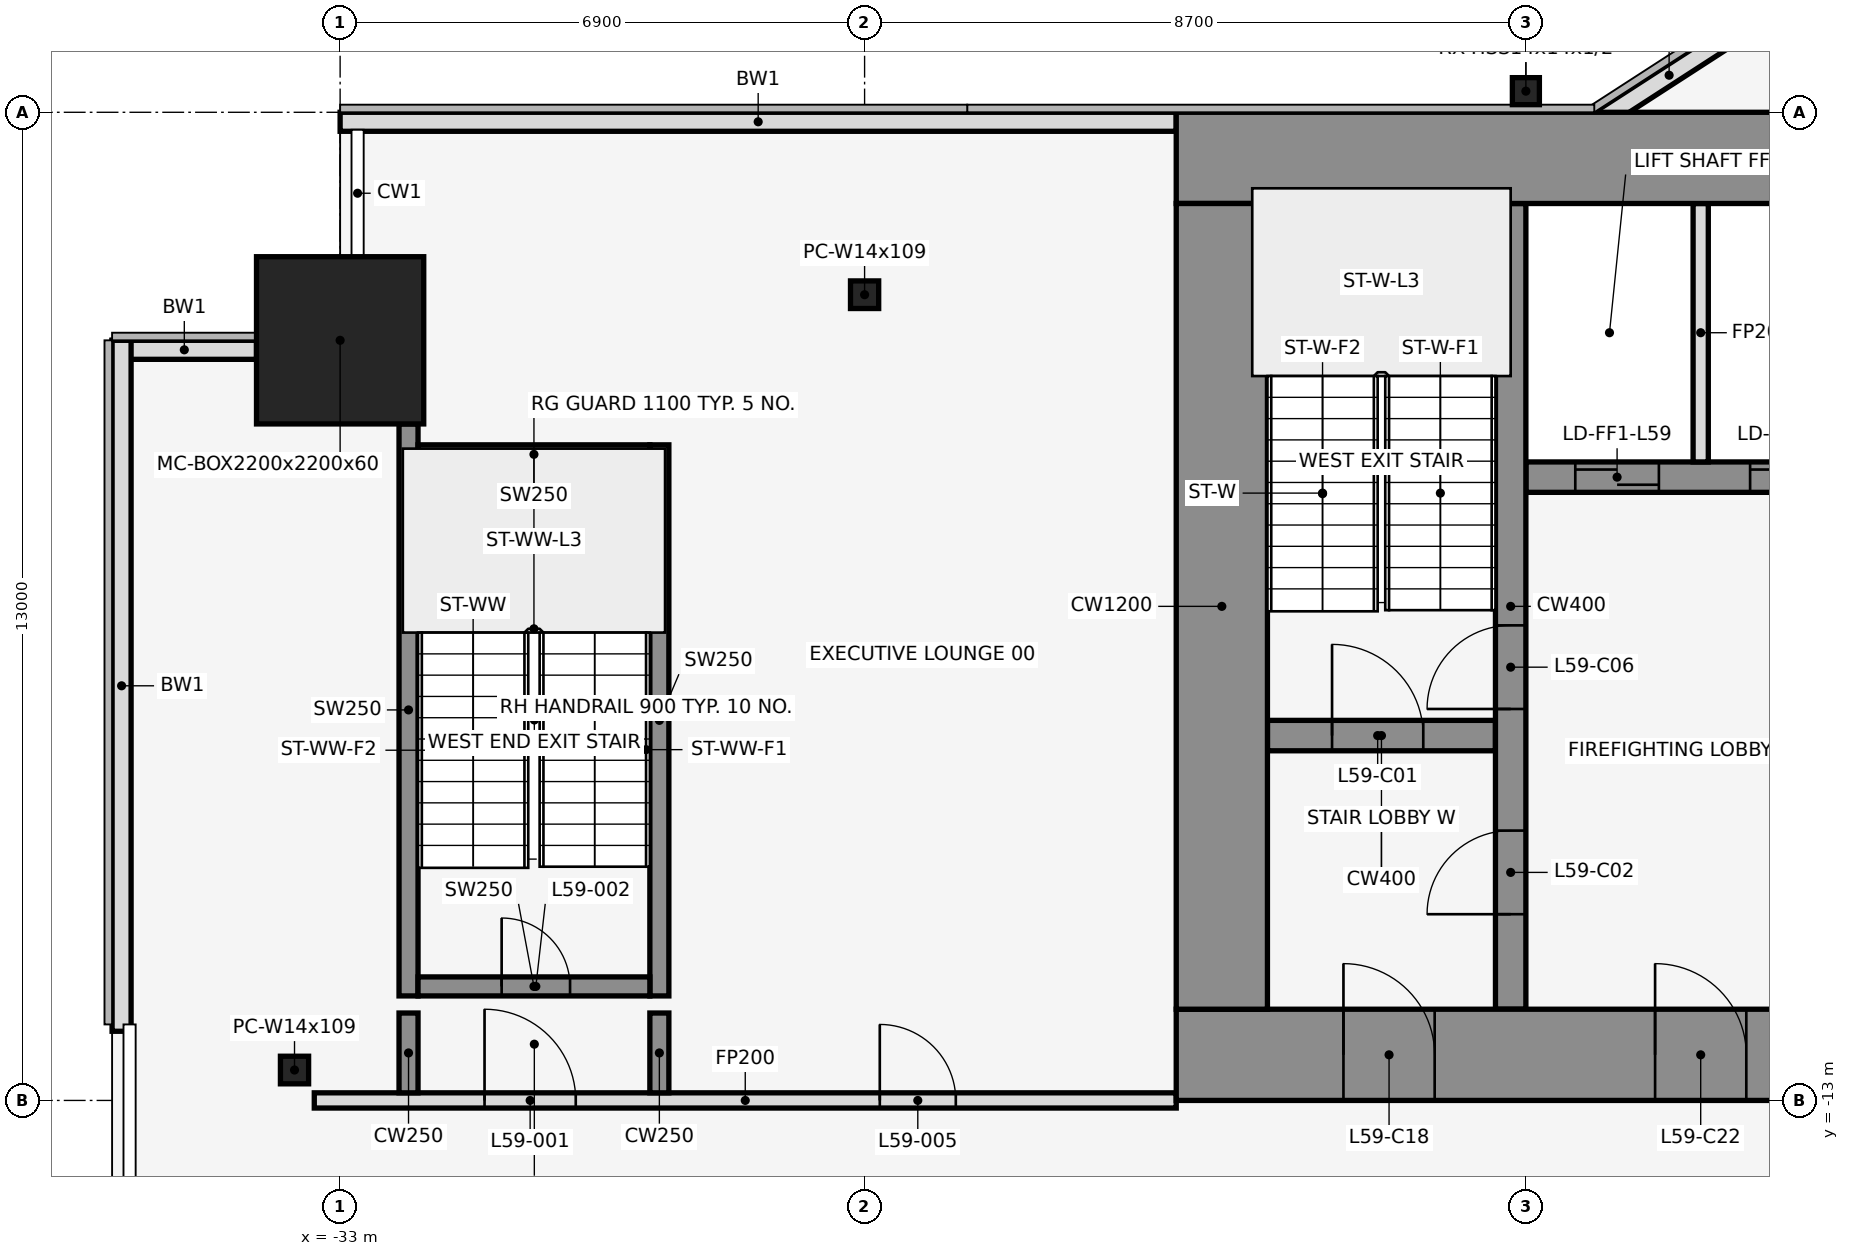
"""IFC4 building model, lengths in metres.
Left out: names, types, materials, properties, quantities, classifications, styles, units other than length and angle.
Written with IfcOpenShell. Run it as: python <this file> out.ifc"""

import sys

from ifc_helpers import new_model, si_unit, direction, frame, frame_2d, origin, origin_2d, place, context, subcontext, project, spatial, rectangle, hollow_rectangle, i_section, extrude, element, fill, save


model = new_model("IFC4")
c1 = context("Model", 3, precision=1e-05, world=origin(), true_north=direction((0.0, 1.0)))
c2 = subcontext(c1, "Body", "Model", "MODEL_VIEW")
j1 = project(units=[si_unit("LENGTHUNIT", "METRE"), si_unit("PLANEANGLEUNIT", "RADIAN")], contexts=[c1])
p1 = place(None, origin())
s1 = spatial("IfcSite", under=j1, at=p1, CompositionType="ELEMENT")
p2 = place(p1, origin())
s2 = spatial("IfcBuilding", under=s1, at=p2, CompositionType="ELEMENT")
p3 = place(p2, frame((0.0, 0.0, 262.4)))
s3 = spatial("IfcBuildingStorey", under=s2, at=p3, CompositionType="ELEMENT", Elevation=262.4)
p4 = place(p3, frame((-33.0, -3.0, 0.0), z_axis=(0.0, 0.0, 1.0), x_axis=(1.0, 0.0, 0.0)))
e1 = element("IfcColumn", 1, at=p4, inside=s3, PredefinedType="COLUMN", context=c2, shape_type="SweptSolid", body=[
    extrude(hollow_rectangle(XDim=2.2, YDim=2.2, WallThickness=0.06, at=origin_2d()), origin(), (0.0, 0.0, 1.0), 4.2),
])
p5 = place(p3, frame((-26.1, -2.4, 0.0), z_axis=(0.0, 0.0, 1.0), x_axis=(1.0, 0.0, 0.0)))
e2 = element("IfcColumn", 2, at=p5, inside=s3, PredefinedType="COLUMN", context=c2, shape_type="SweptSolid", body=[
    extrude(i_section(OverallWidth=0.371, OverallDepth=0.363, WebThickness=0.013, FlangeThickness=0.022, at=origin_2d()), origin(), (0.0, 0.0, 1.0), 4.2),
])
p6 = place(p3, frame((-17.4, 0.278, 0.0), z_axis=(0.0, 0.0, 1.0), x_axis=(1.0, 0.0, 0.0)))
e3 = element("IfcColumn", 3, at=p6, inside=s3, PredefinedType="COLUMN", context=c2, shape_type="SweptSolid", body=[
    extrude(hollow_rectangle(XDim=0.356, YDim=0.356, WallThickness=0.012, at=origin_2d()), origin(), (0.0, 0.0, 1.0), 4.2),
])
p7 = place(p3, frame((-33.6, -12.6, 0.0), z_axis=(0.0, 0.0, 1.0), x_axis=(1.0, 0.0, 0.0)))
e4 = element("IfcColumn", 4, at=p7, inside=s3, PredefinedType="COLUMN", context=c2, shape_type="SweptSolid", body=[
    extrude(i_section(OverallWidth=0.371, OverallDepth=0.363, WebThickness=0.013, FlangeThickness=0.022, at=origin_2d()), origin(), (0.0, 0.0, 1.0), 4.2),
])
p8 = place(p3, frame((-14.599, 1.08, 0.0), z_axis=(0.0, 0.0, 1.0), x_axis=(-0.83981312244, -0.542875602121, 0.0)))
e5 = element("IfcWall", 5, at=p8, inside=s3, PredefinedType="STANDARD", context=c2, shape_type="SweptSolid", body=[
    extrude(rectangle(XDim=2.183, YDim=0.25, at=frame_2d((1.091, 0.0))), origin(), (0.0, 0.0, 1.0), 4.05),
])
p9 = place(p3, frame((-22.0, -0.125, 0.0), z_axis=(0.0, 0.0, 1.0), x_axis=(-1.0, 0.0, 0.0)))
e6 = element("IfcWall", 6, at=p9, inside=s3, PredefinedType="STANDARD", context=c2, shape_type="SweptSolid", body=[
    extrude(rectangle(XDim=11.0, YDim=0.25, at=frame_2d((5.5, 0.0))), origin(), (0.0, 0.0, 1.0), 4.05),
])
p10 = place(p3, frame((-34.1, -3.125, 0.0), z_axis=(0.0, 0.0, 1.0), x_axis=(-1.0, 0.0, 0.0)))
e7 = element("IfcWall", 7, at=p10, inside=s3, PredefinedType="STANDARD", context=c2, shape_type="SweptSolid", body=[
    extrude(rectangle(XDim=1.9, YDim=0.25, at=frame_2d((0.95, 0.0))), origin(), (0.0, 0.0, 1.0), 4.05),
])
p11 = place(p3, frame((-35.875, -3.0, 0.0), z_axis=(0.0, 0.0, 1.0), x_axis=(0.0, -1.0, 0.0)))
e8 = element("IfcWall", 8, at=p11, inside=s3, PredefinedType="STANDARD", context=c2, shape_type="SweptSolid", body=[
    extrude(rectangle(XDim=9.09, YDim=0.25, at=frame_2d((4.545, 0.0))), origin(), (0.0, 0.0, 1.0), 4.05),
])
p12 = place(p3, frame((-32.1, -11.625, 0.0), z_axis=(0.0, 0.0, 1.0), x_axis=(0.0, 1.0, 0.0)))
e9 = element("IfcWall", 9, at=p12, inside=s3, PredefinedType="SHEAR", context=c2, shape_type="SweptSolid", body=[
    extrude(rectangle(XDim=7.525, YDim=0.25, at=frame_2d((3.762, 0.0))), origin(), (0.0, 0.0, 1.0), 4.2),
])
p13 = place(p3, frame((-28.8, -11.625, 0.0), z_axis=(0.0, 0.0, 1.0), x_axis=(0.0, 1.0, 0.0)))
e10 = element("IfcWall", 10, at=p13, inside=s3, PredefinedType="SHEAR", context=c2, shape_type="SweptSolid", body=[
    extrude(rectangle(XDim=7.25, YDim=0.25, at=frame_2d((3.625, 0.0))), origin(), (0.0, 0.0, 1.0), 4.2),
])
p14 = place(p3, frame((-31.975, -11.5, 0.0), z_axis=(0.0, 0.0, 1.0), x_axis=(1.0, 0.0, 0.0)))
e11 = element("IfcWall", 11, at=p14, inside=s3, PredefinedType="SHEAR", context=c2, shape_type="SweptSolid", body=[
    extrude(rectangle(XDim=3.05, YDim=0.25, at=frame_2d((1.525, 0.0))), origin(), (0.0, 0.0, 1.0), 4.2),
])
p15 = place(p14, frame((1.1, 0.0, 0.0)))
e12 = element("IfcOpeningElement", 12, at=p15, cuts=e11, PredefinedType="OPENING", context=c2, shape_type="SweptSolid", body=[
    extrude(rectangle(XDim=0.9, YDim=2.1, at=frame_2d((0.45, 1.05))), frame((0.0, 0.137, 0.0), z_axis=(0.0, -1.0, 0.0), x_axis=(1.0, 0.0, 0.0)), (0.0, 0.0, 1.0), 0.274),
])
p16 = place(p3, frame((-31.975, -4.5, 0.0), z_axis=(0.0, 0.0, 1.0), x_axis=(1.0, 0.0, 0.0)))
e13 = element("IfcWall", 13, at=p16, inside=s3, PredefinedType="SHEAR", context=c2, shape_type="SweptSolid", body=[
    extrude(rectangle(XDim=3.05, YDim=0.25, at=frame_2d((1.525, 0.0))), origin(), (0.0, 0.0, 1.0), 4.2),
])
p17 = place(p3, frame((-33.34, -13.0, 0.0), z_axis=(0.0, 0.0, 1.0), x_axis=(1.0, 0.0, 0.0)))
e14 = element("IfcWall", 14, at=p17, inside=s3, PredefinedType="PARTITIONING", context=c2, shape_type="SweptSolid", body=[
    extrude(rectangle(XDim=11.34, YDim=0.2, at=frame_2d((5.67, 0.0))), origin(), (0.0, 0.0, 1.0), 3.118),
])
p18 = place(p17, frame((2.24, 0.0, 0.0)))
e15 = element("IfcOpeningElement", 15, at=p18, cuts=e14, PredefinedType="OPENING", context=c2, shape_type="SweptSolid", body=[
    extrude(rectangle(XDim=1.2, YDim=2.1, at=frame_2d((0.6, 1.05))), frame((0.0, 0.112, 0.0), z_axis=(0.0, -1.0, 0.0), x_axis=(1.0, 0.0, 0.0)), (0.0, 0.0, 1.0), 0.224),
])
p19 = place(p17, frame((7.44, 0.0, 0.0)))
e16 = element("IfcOpeningElement", 16, at=p19, cuts=e14, PredefinedType="OPENING", context=c2, shape_type="SweptSolid", body=[
    extrude(rectangle(XDim=1.0, YDim=2.1, at=frame_2d((0.5, 1.05))), frame((0.0, 0.112, 0.0), z_axis=(0.0, -1.0, 0.0), x_axis=(1.0, 0.0, 0.0)), (0.0, 0.0, 1.0), 0.224),
])
for number, where, z_axis, x_axis in (
    (17, (-32.1, -12.9, 0.0), (0.0, 0.0, 1.0), (0.0, 1.0, 0.0)),
    (18, (-28.8, -12.9, 0.0), (0.0, 0.0, 1.0), (0.0, 1.0, 0.0)),
):
    element("IfcWall", number, at=place(p3, frame(where, z_axis=z_axis, x_axis=x_axis)), inside=s3, PredefinedType="SHEAR", context=c2, shape_type="SweptSolid", body=[
        extrude(rectangle(XDim=1.05, YDim=0.25, at=frame_2d((0.525, 0.0))), origin(), (0.0, 0.0, 1.0), 4.2),
    ])
p20 = place(p3, frame((-20.8, -8.2, 0.0), z_axis=(0.0, 0.0, 1.0), x_axis=(1.0, 0.0, 0.0)))
e19 = element("IfcWall", 19, at=p20, inside=s3, PredefinedType="SHEAR", context=c2, shape_type="SweptSolid", body=[
    extrude(rectangle(XDim=3.0, YDim=0.4, at=frame_2d((1.5, 0.0))), origin(), (0.0, 0.0, 1.0), 4.2),
])
p21 = place(p20, frame((0.85, 0.0, 0.0)))
e20 = element("IfcOpeningElement", 20, at=p21, cuts=e19, PredefinedType="OPENING", context=c2, shape_type="SweptSolid", body=[
    extrude(rectangle(XDim=1.2, YDim=2.1, at=frame_2d((0.6, 1.05))), frame((0.0, 0.212, 0.0), z_axis=(0.0, -1.0, 0.0), x_axis=(1.0, 0.0, 0.0)), (0.0, 0.0, 1.0), 0.424),
])
p22 = place(p3, frame((-17.4, -4.8, 0.0), z_axis=(0.0, 0.0, 1.0), x_axis=(1.0, 0.0, 0.0)))
e21 = element("IfcWall", 21, at=p22, inside=s3, PredefinedType="SHEAR", context=c2, shape_type="SweptSolid", body=[
    extrude(rectangle(XDim=13.6, YDim=0.4, at=frame_2d((6.8, 0.0))), origin(), (0.0, 0.0, 1.0), 4.2),
])
p23 = place(p22, frame((0.65, 0.0, 0.0)))
e22 = element("IfcOpeningElement", 22, at=p23, cuts=e21, PredefinedType="OPENING", context=c2, shape_type="SweptSolid", body=[
    extrude(rectangle(XDim=1.1, YDim=2.1, at=frame_2d((0.55, 1.05))), frame((0.0, 0.212, 0.0), z_axis=(0.0, -1.0, 0.0), x_axis=(1.0, 0.0, 0.0)), (0.0, 0.0, 1.0), 0.424),
])
p24 = place(p22, frame((2.95, 0.0, 0.0)))
e23 = element("IfcOpeningElement", 23, at=p24, cuts=e21, PredefinedType="OPENING", context=c2, shape_type="SweptSolid", body=[
    extrude(rectangle(XDim=1.1, YDim=2.1, at=frame_2d((0.55, 1.05))), frame((0.0, 0.212, 0.0), z_axis=(0.0, -1.0, 0.0), x_axis=(1.0, 0.0, 0.0)), (0.0, 0.0, 1.0), 0.424),
])
p25 = place(p22, frame((5.85, 0.0, 0.0)))
e24 = element("IfcOpeningElement", 24, at=p25, cuts=e21, PredefinedType="OPENING", context=c2, shape_type="SweptSolid", body=[
    extrude(rectangle(XDim=0.9, YDim=2.1, at=frame_2d((0.45, 1.05))), frame((0.0, 0.212, 0.0), z_axis=(0.0, -1.0, 0.0), x_axis=(1.0, 0.0, 0.0)), (0.0, 0.0, 1.0), 0.424),
])
p26 = place(p22, frame((10.25, 0.0, 0.0)))
e25 = element("IfcOpeningElement", 25, at=p26, cuts=e21, PredefinedType="OPENING", context=c2, shape_type="SweptSolid", body=[
    extrude(rectangle(XDim=0.9, YDim=2.1, at=frame_2d((0.45, 1.05))), frame((0.0, 0.212, 0.0), z_axis=(0.0, -1.0, 0.0), x_axis=(1.0, 0.0, 0.0)), (0.0, 0.0, 1.0), 0.424),
])
p27 = place(p3, frame((-17.6, -11.8, 0.0), z_axis=(0.0, 0.0, 1.0), x_axis=(0.0, 1.0, 0.0)))
e26 = element("IfcWall", 26, at=p27, inside=s3, PredefinedType="SHEAR", context=c2, shape_type="SweptSolid", body=[
    extrude(rectangle(XDim=10.6, YDim=0.4, at=frame_2d((5.3, 0.0))), origin(), (0.0, 0.0, 1.0), 4.2),
])
p28 = place(p27, frame((1.25, 0.0, 0.0)))
e27 = element("IfcOpeningElement", 27, at=p28, cuts=e26, PredefinedType="OPENING", context=c2, shape_type="SweptSolid", body=[
    extrude(rectangle(XDim=1.1, YDim=2.1, at=frame_2d((0.55, 1.05))), frame((0.0, 0.212, 0.0), z_axis=(0.0, -1.0, 0.0), x_axis=(1.0, 0.0, 0.0)), (0.0, 0.0, 1.0), 0.424),
])
p29 = place(p27, frame((3.95, 0.0, 0.0)))
e28 = element("IfcOpeningElement", 28, at=p29, cuts=e26, PredefinedType="OPENING", context=c2, shape_type="SweptSolid", body=[
    extrude(rectangle(XDim=1.1, YDim=2.1, at=frame_2d((0.55, 1.05))), frame((0.0, 0.212, 0.0), z_axis=(0.0, -1.0, 0.0), x_axis=(1.0, 0.0, 0.0)), (0.0, 0.0, 1.0), 0.424),
])
p30 = place(p3, frame((-15.1, -4.6, 0.0), z_axis=(0.0, 0.0, 1.0), x_axis=(0.0, 1.0, 0.0)))
e29 = element("IfcWall", 29, at=p30, inside=s3, PredefinedType="PARTITIONING", context=c2, shape_type="SweptSolid", body=[
    extrude(rectangle(XDim=3.4, YDim=0.2, at=frame_2d((1.7, 0.0))), origin(), (0.0, 0.0, 1.0), 3.118),
])
p31 = place(p3, frame((-22.0, -0.6, 0.0), z_axis=(0.0, 0.0, 1.0), x_axis=(1.0, 0.0, 0.0)))
e30 = element("IfcWall", 30, at=p31, inside=s3, PredefinedType="SHEAR", context=c2, shape_type="SweptSolid", body=[
    extrude(rectangle(XDim=44.0, YDim=1.2, at=frame_2d((22.0, 0.0))), origin(), (0.0, 0.0, 1.0), 4.2),
])
p32 = place(p31, frame((18.55, 0.0, 0.0)))
e31 = element("IfcOpeningElement", 31, at=p32, cuts=e30, PredefinedType="OPENING", context=c2, shape_type="SweptSolid", body=[
    extrude(rectangle(XDim=0.9, YDim=2.1, at=frame_2d((0.45, 1.05))), frame((0.0, 0.612, 0.0), z_axis=(0.0, -1.0, 0.0), x_axis=(1.0, 0.0, 0.0)), (0.0, 0.0, 1.0), 1.224),
])
p33 = place(p31, frame((24.55, 0.0, 0.0)))
e32 = element("IfcOpeningElement", 32, at=p33, cuts=e30, PredefinedType="OPENING", context=c2, shape_type="SweptSolid", body=[
    extrude(rectangle(XDim=0.9, YDim=2.1, at=frame_2d((0.45, 1.05))), frame((0.0, 0.612, 0.0), z_axis=(0.0, -1.0, 0.0), x_axis=(1.0, 0.0, 0.0)), (0.0, 0.0, 1.0), 1.224),
])
p34 = place(p3, frame((-22.0, -12.4, 0.0), z_axis=(0.0, 0.0, 1.0), x_axis=(1.0, 0.0, 0.0)))
e33 = element("IfcWall", 33, at=p34, inside=s3, PredefinedType="SHEAR", context=c2, shape_type="SweptSolid", body=[
    extrude(rectangle(XDim=44.0, YDim=1.2, at=frame_2d((22.0, 0.0))), origin(), (0.0, 0.0, 1.0), 4.2),
])
p35 = place(p34, frame((2.2, 0.0, 0.0)))
e34 = element("IfcOpeningElement", 34, at=p35, cuts=e33, PredefinedType="OPENING", context=c2, shape_type="SweptSolid", body=[
    extrude(rectangle(XDim=1.2, YDim=2.1, at=frame_2d((0.6, 1.05))), frame((0.0, 0.612, 0.0), z_axis=(0.0, -1.0, 0.0), x_axis=(1.0, 0.0, 0.0)), (0.0, 0.0, 1.0), 1.224),
])
p36 = place(p34, frame((21.4, 0.0, 0.0)))
e35 = element("IfcOpeningElement", 35, at=p36, cuts=e33, PredefinedType="OPENING", context=c2, shape_type="SweptSolid", body=[
    extrude(rectangle(XDim=1.2, YDim=2.1, at=frame_2d((0.6, 1.05))), frame((0.0, 0.612, 0.0), z_axis=(0.0, -1.0, 0.0), x_axis=(1.0, 0.0, 0.0)), (0.0, 0.0, 1.0), 1.224),
])
p37 = place(p34, frame((40.6, 0.0, 0.0)))
e36 = element("IfcOpeningElement", 36, at=p37, cuts=e33, PredefinedType="OPENING", context=c2, shape_type="SweptSolid", body=[
    extrude(rectangle(XDim=1.2, YDim=2.1, at=frame_2d((0.6, 1.05))), frame((0.0, 0.612, 0.0), z_axis=(0.0, -1.0, 0.0), x_axis=(1.0, 0.0, 0.0)), (0.0, 0.0, 1.0), 1.224),
])
p38 = place(p34, frame((16.0, 0.0, 0.0)))
e37 = element("IfcOpeningElement", 37, at=p38, cuts=e33, PredefinedType="OPENING", context=c2, shape_type="SweptSolid", body=[
    extrude(rectangle(XDim=1.8, YDim=2.1, at=frame_2d((0.9, 1.05))), frame((0.0, 0.612, 0.0), z_axis=(0.0, -1.0, 0.0), x_axis=(1.0, 0.0, 0.0)), (0.0, 0.0, 1.0), 1.224),
])
p39 = place(p34, frame((6.3, 0.0, 0.0)))
e38 = element("IfcOpeningElement", 38, at=p39, cuts=e33, PredefinedType="OPENING", context=c2, shape_type="SweptSolid", body=[
    extrude(rectangle(XDim=1.2, YDim=2.1, at=frame_2d((0.6, 1.05))), frame((0.0, 0.612, 0.0), z_axis=(0.0, -1.0, 0.0), x_axis=(1.0, 0.0, 0.0)), (0.0, 0.0, 1.0), 1.224),
])
p40 = place(p34, frame((26.2, 0.0, 0.0)))
e39 = element("IfcOpeningElement", 39, at=p40, cuts=e33, PredefinedType="OPENING", context=c2, shape_type="SweptSolid", body=[
    extrude(rectangle(XDim=1.8, YDim=2.1, at=frame_2d((0.9, 1.05))), frame((0.0, 0.612, 0.0), z_axis=(0.0, -1.0, 0.0), x_axis=(1.0, 0.0, 0.0)), (0.0, 0.0, 1.0), 1.224),
])
p41 = place(p34, frame((36.5, 0.0, 0.0)))
e40 = element("IfcOpeningElement", 40, at=p41, cuts=e33, PredefinedType="OPENING", context=c2, shape_type="SweptSolid", body=[
    extrude(rectangle(XDim=1.2, YDim=2.1, at=frame_2d((0.6, 1.05))), frame((0.0, 0.612, 0.0), z_axis=(0.0, -1.0, 0.0), x_axis=(1.0, 0.0, 0.0)), (0.0, 0.0, 1.0), 1.224),
])
p42 = place(p3, frame((-21.4, -11.8, 0.0), z_axis=(0.0, 0.0, 1.0), x_axis=(0.0, 1.0, 0.0)))
e41 = element("IfcWall", 41, at=p42, inside=s3, PredefinedType="SHEAR", context=c2, shape_type="SweptSolid", body=[
    extrude(rectangle(XDim=10.6, YDim=1.2, at=frame_2d((5.3, 0.0))), origin(), (0.0, 0.0, 1.0), 4.2),
])
p43 = place(p18, origin())
e42 = element("IfcDoor", 42, at=p43, inside=s3, OperationType="SINGLE_SWING_LEFT", PredefinedType="DOOR", context=c2, shape_type="SweptSolid", body=[
    extrude(rectangle(XDim=1.2, YDim=2.1, at=frame_2d((0.6, 1.05))), frame((0.0, 0.025, 0.0), z_axis=(0.0, -1.0, 0.0), x_axis=(1.0, 0.0, 0.0)), (0.0, 0.0, 1.0), 0.05),
])
fill(e15, e42)
p44 = place(p15, origin())
e43 = element("IfcDoor", 43, at=p44, inside=s3, OperationType="SINGLE_SWING_LEFT", PredefinedType="DOOR", context=c2, shape_type="SweptSolid", body=[
    extrude(rectangle(XDim=0.9, YDim=2.1, at=frame_2d((0.45, 1.05))), frame((0.0, 0.025, 0.0), z_axis=(0.0, -1.0, 0.0), x_axis=(1.0, 0.0, 0.0)), (0.0, 0.0, 1.0), 0.05),
])
fill(e12, e43)
p45 = place(p19, origin())
e44 = element("IfcDoor", 44, at=p45, inside=s3, OperationType="SINGLE_SWING_LEFT", PredefinedType="DOOR", context=c2, shape_type="SweptSolid", body=[
    extrude(rectangle(XDim=1.0, YDim=2.1, at=frame_2d((0.5, 1.05))), frame((0.0, 0.025, 0.0), z_axis=(0.0, -1.0, 0.0), x_axis=(1.0, 0.0, 0.0)), (0.0, 0.0, 1.0), 0.05),
])
fill(e16, e44)
p46 = place(p21, origin())
e45 = element("IfcDoor", 45, at=p46, inside=s3, OperationType="SINGLE_SWING_LEFT", PredefinedType="DOOR", context=c2, shape_type="SweptSolid", body=[
    extrude(rectangle(XDim=1.2, YDim=2.1, at=frame_2d((0.6, 1.05))), frame((0.0, 0.025, 0.0), z_axis=(0.0, -1.0, 0.0), x_axis=(1.0, 0.0, 0.0)), (0.0, 0.0, 1.0), 0.05),
])
fill(e20, e45)
p47 = place(p28, frame((1.1, 0.0, 0.0), z_axis=(0.0, 0.0, 1.0), x_axis=(-1.0, 0.0, 0.0)))
e46 = element("IfcDoor", 46, at=p47, inside=s3, OperationType="SINGLE_SWING_LEFT", PredefinedType="DOOR", context=c2, shape_type="SweptSolid", body=[
    extrude(rectangle(XDim=1.1, YDim=2.1, at=frame_2d((0.55, 1.05))), frame((0.0, 0.025, 0.0), z_axis=(0.0, -1.0, 0.0), x_axis=(1.0, 0.0, 0.0)), (0.0, 0.0, 1.0), 0.05),
])
fill(e27, e46)
p48 = place(p23, origin())
e47 = element("IfcDoor", 47, at=p48, inside=s3, OperationType="DOUBLE_DOOR_SLIDING", PredefinedType="DOOR", context=c2, shape_type="SweptSolid", body=[
    extrude(rectangle(XDim=1.1, YDim=2.1, at=frame_2d((0.55, 1.05))), frame((0.0, 0.025, 0.0), z_axis=(0.0, -1.0, 0.0), x_axis=(1.0, 0.0, 0.0)), (0.0, 0.0, 1.0), 0.05),
])
fill(e22, e47)
p49 = place(p24, origin())
e48 = element("IfcDoor", 48, at=p49, inside=s3, OperationType="DOUBLE_DOOR_SLIDING", PredefinedType="DOOR", context=c2, shape_type="SweptSolid", body=[
    extrude(rectangle(XDim=1.1, YDim=2.1, at=frame_2d((0.55, 1.05))), frame((0.0, 0.025, 0.0), z_axis=(0.0, -1.0, 0.0), x_axis=(1.0, 0.0, 0.0)), (0.0, 0.0, 1.0), 0.05),
])
fill(e23, e48)
p50 = place(p29, frame((1.1, 0.0, 0.0), z_axis=(0.0, 0.0, 1.0), x_axis=(-1.0, 0.0, 0.0)))
e49 = element("IfcDoor", 49, at=p50, inside=s3, OperationType="SINGLE_SWING_LEFT", PredefinedType="DOOR", context=c2, shape_type="SweptSolid", body=[
    extrude(rectangle(XDim=1.1, YDim=2.1, at=frame_2d((0.55, 1.05))), frame((0.0, 0.025, 0.0), z_axis=(0.0, -1.0, 0.0), x_axis=(1.0, 0.0, 0.0)), (0.0, 0.0, 1.0), 0.05),
])
fill(e28, e49)
p51 = place(p35, frame((1.2, 0.0, 0.0), z_axis=(0.0, 0.0, 1.0), x_axis=(-1.0, 0.0, 0.0)))
e50 = element("IfcDoor", 50, at=p51, inside=s3, OperationType="SINGLE_SWING_RIGHT", PredefinedType="DOOR", context=c2, shape_type="SweptSolid", body=[
    extrude(rectangle(XDim=1.2, YDim=2.1, at=frame_2d((0.6, 1.05))), frame((0.0, 0.025, 0.0), z_axis=(0.0, -1.0, 0.0), x_axis=(1.0, 0.0, 0.0)), (0.0, 0.0, 1.0), 0.05),
])
fill(e34, e50)
p52 = place(p39, frame((1.2, 0.0, 0.0), z_axis=(0.0, 0.0, 1.0), x_axis=(-1.0, 0.0, 0.0)))
e51 = element("IfcDoor", 51, at=p52, inside=s3, OperationType="SINGLE_SWING_RIGHT", PredefinedType="DOOR", context=c2, shape_type="SweptSolid", body=[
    extrude(rectangle(XDim=1.2, YDim=2.1, at=frame_2d((0.6, 1.05))), frame((0.0, 0.025, 0.0), z_axis=(0.0, -1.0, 0.0), x_axis=(1.0, 0.0, 0.0)), (0.0, 0.0, 1.0), 0.05),
])
fill(e38, e51)
save(model, sys.argv[1])
